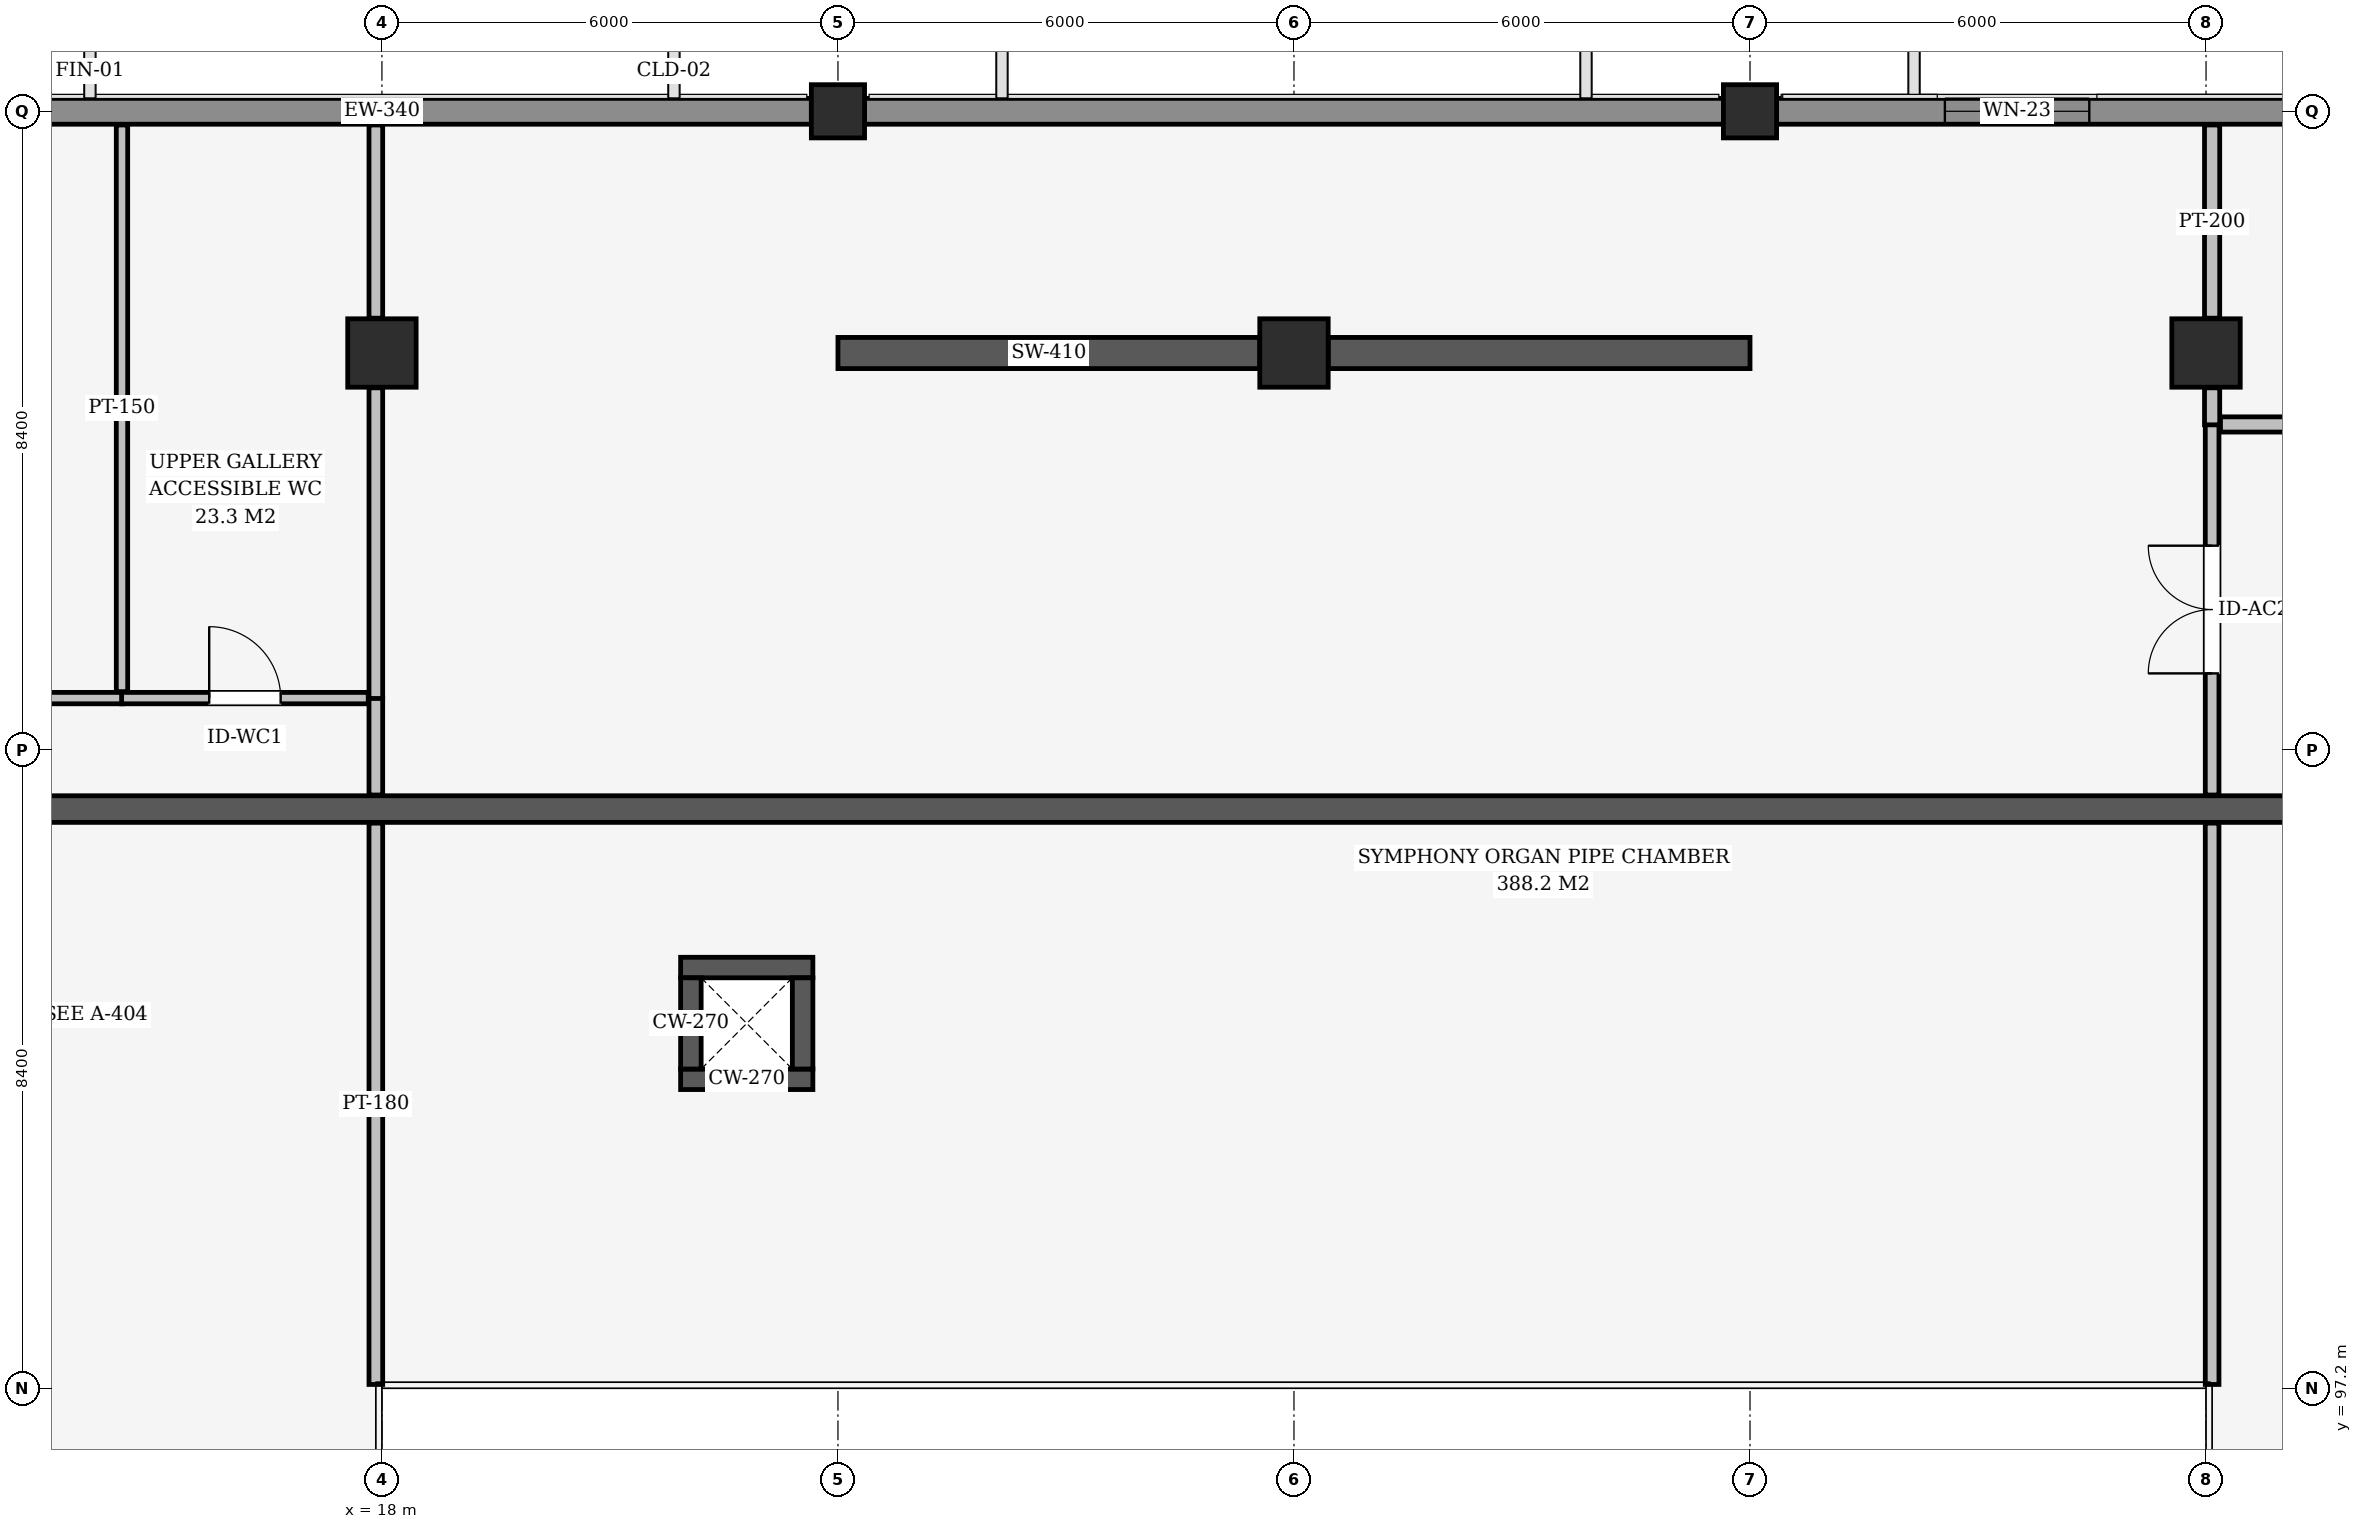
"""IFC4 building model, lengths in metres.
Left out: names, types, materials, properties, quantities, classifications, styles, units other than length and angle.
Written with IfcOpenShell. Run it as: python <this file> out.ifc"""

import sys

from ifc_helpers import new_model, si_unit, direction, frame, frame_2d, origin, origin_2d, place, context, subcontext, project, spatial, rectangle, extrude, element, fill, save


model = new_model("IFC4")
c1 = context("Model", 3, precision=1e-05, world=origin(), true_north=direction((0.0, 1.0)))
c2 = subcontext(c1, "Body", "Model", "MODEL_VIEW")
j1 = project(units=[si_unit("LENGTHUNIT", "METRE"), si_unit("PLANEANGLEUNIT", "RADIAN")], contexts=[c1])
p1 = place(None, origin())
s1 = spatial("IfcSite", under=j1, at=p1, CompositionType="ELEMENT")
p2 = place(p1, origin())
s2 = spatial("IfcBuilding", under=s1, at=p2, CompositionType="ELEMENT")
p3 = place(p2, frame((0.0, 0.0, 13.8)))
s3 = spatial("IfcBuildingStorey", under=s2, at=p3, CompositionType="ELEMENT", Elevation=13.8)
for number, where, z_axis, x_axis in (
    (1, (24.0, 114.0, 0.0), (0.0, 0.0, 1.0), (1.0, 0.0, 0.0)),
    (2, (36.0, 114.0, 0.0), (0.0, 0.0, 1.0), (1.0, 0.0, 0.0)),
):
    element("IfcColumn", number, at=place(p3, frame(where, z_axis=z_axis, x_axis=x_axis)), inside=s3, PredefinedType="COLUMN", context=c2, shape_type="SweptSolid", body=[
        extrude(rectangle(XDim=0.7, YDim=0.7, at=origin_2d()), origin(), (0.0, 0.0, 1.0), 4.5),
    ])
for number, where, z_axis, x_axis in (
    (3, (18.0, 110.82, 0.0), (0.0, 0.0, 1.0), (1.0, 0.0, 0.0)),
    (4, (30.0, 110.82, 0.0), (0.0, 0.0, 1.0), (1.0, 0.0, 0.0)),
    (5, (42.0, 110.82, 0.0), (0.0, 0.0, 1.0), (1.0, 0.0, 0.0)),
):
    element("IfcColumn", number, at=place(p3, frame(where, z_axis=z_axis, x_axis=x_axis)), inside=s3, PredefinedType="COLUMN", context=c2, shape_type="SweptSolid", body=[
        extrude(rectangle(XDim=0.9, YDim=0.9, at=origin_2d()), origin(), (0.0, 0.0, 1.0), 4.5),
    ])
p4 = place(p3, frame((12.005, 104.82, 0.0), z_axis=(0.0, 0.0, 1.0), x_axis=(1.0, 0.0, 0.0)))
e6 = element("IfcWall", 6, at=p4, inside=s3, PredefinedType="SHEAR", context=c2, shape_type="SweptSolid", body=[
    extrude(rectangle(XDim=35.99, YDim=0.35, at=frame_2d((17.995, 0.0))), origin(), (0.0, 0.0, 1.0), 4.2),
])
for number, where, z_axis, x_axis in (
    (7, (24.0, 110.82, 0.0), (0.0, 0.0, 1.0), (1.0, 0.0, 0.0)),
    (8, (30.45, 110.82, 0.0), (0.0, 0.0, 1.0), (1.0, 0.0, 0.0)),
):
    element("IfcWall", number, at=place(p3, frame(where, z_axis=z_axis, x_axis=x_axis)), inside=s3, PredefinedType="SHEAR", context=c2, shape_type="SweptSolid", body=[
        extrude(rectangle(XDim=5.55, YDim=0.41, at=frame_2d((2.775, 0.0))), origin(), (0.0, 0.0, 1.0), 3.505),
    ])
for number, where, z_axis, x_axis in (
    (9, (12.35, 114.0, 0.0), (0.0, 0.0, 1.0), (1.0, 0.0, 0.0)),
    (10, (24.35, 114.0, 0.0), (0.0, 0.0, 1.0), (1.0, 0.0, 0.0)),
):
    element("IfcWall", number, at=place(p3, frame(where, z_axis=z_axis, x_axis=x_axis)), inside=s3, PredefinedType="SOLIDWALL", context=c2, shape_type="SweptSolid", body=[
        extrude(rectangle(XDim=11.3, YDim=0.34, at=frame_2d((5.65, 0.0))), origin(), (0.0, 0.0, 1.0), 3.569),
    ])
p5 = place(p3, frame((36.35, 114.0, 0.0), z_axis=(0.0, 0.0, 1.0), x_axis=(1.0, 0.0, 0.0)))
e11 = element("IfcWall", 11, at=p5, inside=s3, PredefinedType="SOLIDWALL", context=c2, shape_type="SweptSolid", body=[
    extrude(rectangle(XDim=11.3, YDim=0.34, at=frame_2d((5.65, 0.0))), origin(), (0.0, 0.0, 1.0), 3.569),
])
p6 = place(p5, frame((2.214, 0.0, 0.85)))
e12 = element("IfcOpeningElement", 12, at=p6, cuts=e11, PredefinedType="OPENING", context=c2, shape_type="SweptSolid", body=[
    extrude(rectangle(XDim=1.9, YDim=1.6, at=frame_2d((0.95, 0.8))), frame((0.0, 0.18, 0.0), z_axis=(0.0, -1.0, 0.0), x_axis=(1.0, 0.0, 0.0)), (0.0, 0.0, 1.0), 0.36),
])
for number, where, z_axis, x_axis in (
    (13, (21.93, 101.265, 0.0), (0.0, 0.0, 1.0), (1.0, 0.0, 0.0)),
    (14, (21.93, 102.735, 0.0), (0.0, 0.0, 1.0), (1.0, 0.0, 0.0)),
):
    element("IfcWall", number, at=place(p3, frame(where, z_axis=z_axis, x_axis=x_axis)), inside=s3, PredefinedType="SHEAR", context=c2, shape_type="SweptSolid", body=[
        extrude(rectangle(XDim=1.74, YDim=0.27, at=frame_2d((0.87, 0.0))), origin(), (0.0, 0.0, 1.0), 4.2),
    ])
for number, where, z_axis, x_axis in (
    (15, (22.065, 101.4, 0.0), (0.0, 0.0, 1.0), (0.0, 1.0, 0.0)),
    (16, (23.535, 101.4, 0.0), (0.0, 0.0, 1.0), (0.0, 1.0, 0.0)),
):
    element("IfcWall", number, at=place(p3, frame(where, z_axis=z_axis, x_axis=x_axis)), inside=s3, PredefinedType="SHEAR", context=c2, shape_type="SweptSolid", body=[
        extrude(rectangle(XDim=1.2, YDim=0.27, at=frame_2d((0.6, 0.0))), origin(), (0.0, 0.0, 1.0), 4.2),
    ])
p7 = place(p3, frame((17.92, 97.25, 0.0), z_axis=(0.0, 0.0, 1.0), x_axis=(0.0, 1.0, 0.0)))
e17 = element("IfcWall", 17, at=p7, inside=s3, PredefinedType="PARTITIONING", context=c2, shape_type="SweptSolid", body=[
    extrude(rectangle(XDim=7.385, YDim=0.18, at=frame_2d((3.692, 0.0))), origin(), (0.0, 0.0, 1.0), 4.5),
])
p8 = place(p3, frame((17.92, 105.005, 0.0), z_axis=(0.0, 0.0, 1.0), x_axis=(0.0, 1.0, 0.0)))
e18 = element("IfcWall", 18, at=p8, inside=s3, PredefinedType="PARTITIONING", context=c2, shape_type="SweptSolid", body=[
    extrude(rectangle(XDim=1.28, YDim=0.18, at=frame_2d((0.64, 0.0))), origin(), (0.0, 0.0, 1.0), 4.5),
])
p9 = place(p3, frame((17.92, 106.275, 0.0), z_axis=(0.0, 0.0, 1.0), x_axis=(0.0, 1.0, 0.0)))
e19 = element("IfcWall", 19, at=p9, inside=s3, PredefinedType="PARTITIONING", context=c2, shape_type="SweptSolid", body=[
    extrude(rectangle(XDim=4.087, YDim=0.18, at=frame_2d((2.043, 0.0))), origin(), (0.0, 0.0, 1.0), 4.5),
])
p10 = place(p3, frame((17.92, 111.278, 0.0), z_axis=(0.0, 0.0, 1.0), x_axis=(0.0, 1.0, 0.0)))
e20 = element("IfcWall", 20, at=p10, inside=s3, PredefinedType="PARTITIONING", context=c2, shape_type="SweptSolid", body=[
    extrude(rectangle(XDim=2.542, YDim=0.18, at=frame_2d((1.271, 0.0))), origin(), (0.0, 0.0, 1.0), 4.5),
])
p11 = place(p3, frame((42.08, 97.25, 0.0), z_axis=(0.0, 0.0, 1.0), x_axis=(0.0, 1.0, 0.0)))
e21 = element("IfcWall", 21, at=p11, inside=s3, PredefinedType="PARTITIONING", context=c2, shape_type="SweptSolid", body=[
    extrude(rectangle(XDim=7.385, YDim=0.18, at=frame_2d((3.692, 0.0))), origin(), (0.0, 0.0, 1.0), 4.5),
])
p12 = place(p3, frame((42.08, 105.005, 0.0), z_axis=(0.0, 0.0, 1.0), x_axis=(0.0, 1.0, 0.0)))
e22 = element("IfcWall", 22, at=p12, inside=s3, PredefinedType="PARTITIONING", context=c2, shape_type="SweptSolid", body=[
    extrude(rectangle(XDim=4.88, YDim=0.18, at=frame_2d((2.44, 0.0))), origin(), (0.0, 0.0, 1.0), 4.5),
])
p13 = place(p12, frame((1.6, 0.0, 0.0)))
e23 = element("IfcOpeningElement", 23, at=p13, cuts=e22, PredefinedType="OPENING", context=c2, shape_type="SweptSolid", body=[
    extrude(rectangle(XDim=1.68, YDim=2.32, at=frame_2d((0.84, 1.16))), frame((0.0, 0.1, 0.0), z_axis=(0.0, -1.0, 0.0), x_axis=(1.0, 0.0, 0.0)), (0.0, 0.0, 1.0), 0.2),
])
p14 = place(p3, frame((42.08, 109.875, 0.0), z_axis=(0.0, 0.0, 1.0), x_axis=(0.0, 1.0, 0.0)))
e24 = element("IfcWall", 24, at=p14, inside=s3, PredefinedType="PARTITIONING", context=c2, shape_type="SweptSolid", body=[
    extrude(rectangle(XDim=0.487, YDim=0.2, at=frame_2d((0.244, 0.0))), origin(), (0.0, 0.0, 1.0), 4.5),
])
p15 = place(p3, frame((42.08, 111.278, 0.0), z_axis=(0.0, 0.0, 1.0), x_axis=(0.0, 1.0, 0.0)))
e25 = element("IfcWall", 25, at=p15, inside=s3, PredefinedType="PARTITIONING", context=c2, shape_type="SweptSolid", body=[
    extrude(rectangle(XDim=2.542, YDim=0.2, at=frame_2d((1.271, 0.0))), origin(), (0.0, 0.0, 1.0), 4.5),
])
p16 = place(p3, frame((0.19, 106.28, 0.0), z_axis=(0.0, 0.0, 1.0), x_axis=(1.0, 0.0, 0.0)))
e26 = element("IfcWall", 26, at=p16, inside=s3, PredefinedType="PARTITIONING", context=c2, shape_type="SweptSolid", body=[
    extrude(rectangle(XDim=14.395, YDim=0.15, at=frame_2d((7.198, 0.0))), origin(), (0.0, 0.0, 1.0), 4.18),
])
p17 = place(p16, frame((6.692, 0.0, 0.0)))
e27 = element("IfcOpeningElement", 27, at=p17, cuts=e26, PredefinedType="OPENING", context=c2, shape_type="SweptSolid", body=[
    extrude(rectangle(XDim=1.01, YDim=2.1, at=frame_2d((0.505, 1.05))), frame((0.0, 0.085, 0.0), z_axis=(0.0, -1.0, 0.0), x_axis=(1.0, 0.0, 0.0)), (0.0, 0.0, 1.0), 0.17),
])
p18 = place(p3, frame((14.575, 106.28, 0.0), z_axis=(0.0, 0.0, 1.0), x_axis=(1.0, 0.0, 0.0)))
e28 = element("IfcWall", 28, at=p18, inside=s3, PredefinedType="PARTITIONING", context=c2, shape_type="SweptSolid", body=[
    extrude(rectangle(XDim=3.245, YDim=0.15, at=frame_2d((1.623, 0.0))), origin(), (0.0, 0.0, 1.0), 4.18),
])
p19 = place(p18, frame((1.153, 0.0, 0.0)))
e29 = element("IfcOpeningElement", 29, at=p19, cuts=e28, PredefinedType="OPENING", context=c2, shape_type="SweptSolid", body=[
    extrude(rectangle(XDim=0.94, YDim=2.1, at=frame_2d((0.47, 1.05))), frame((0.0, 0.085, 0.0), z_axis=(0.0, -1.0, 0.0), x_axis=(1.0, 0.0, 0.0)), (0.0, 0.0, 1.0), 0.17),
])
p20 = place(p3, frame((14.58, 106.365, 0.0), z_axis=(0.0, 0.0, 1.0), x_axis=(0.0, 1.0, 0.0)))
e30 = element("IfcWall", 30, at=p20, inside=s3, PredefinedType="PARTITIONING", context=c2, shape_type="SweptSolid", body=[
    extrude(rectangle(XDim=7.455, YDim=0.15, at=frame_2d((3.728, 0.0))), origin(), (0.0, 0.0, 1.0), 3.723),
])
p21 = place(p3, frame((42.19, 109.88, 0.0), z_axis=(0.0, 0.0, 1.0), x_axis=(1.0, 0.0, 0.0)))
e31 = element("IfcWall", 31, at=p21, inside=s3, PredefinedType="PARTITIONING", context=c2, shape_type="SweptSolid", body=[
    extrude(rectangle(XDim=17.63, YDim=0.2, at=frame_2d((8.815, 0.0))), origin(), (0.0, 0.0, 1.0), 4.18),
])
p22 = place(p21, frame((3.618, 0.0, 0.0)))
e32 = element("IfcOpeningElement", 32, at=p22, cuts=e31, PredefinedType="OPENING", context=c2, shape_type="SweptSolid", body=[
    extrude(rectangle(XDim=1.56, YDim=2.26, at=frame_2d((0.78, 1.13))), frame((0.0, 0.11, 0.0), z_axis=(0.0, -1.0, 0.0), x_axis=(1.0, 0.0, 0.0)), (0.0, 0.0, 1.0), 0.22),
])
p23 = place(p6, origin())
e33 = element("IfcWindow", 33, at=p23, inside=s3, PartitioningType="SINGLE_PANEL", PredefinedType="WINDOW", context=c2, shape_type="SweptSolid", body=[
    extrude(rectangle(XDim=1.9, YDim=1.6, at=frame_2d((0.95, 0.8))), frame((0.0, 0.03, 0.0), z_axis=(0.0, -1.0, 0.0), x_axis=(1.0, 0.0, 0.0)), (0.0, 0.0, 1.0), 0.06),
])
fill(e12, e33)
p24 = place(p13, origin())
e34 = element("IfcDoor", 34, at=p24, inside=s3, OperationType="DOUBLE_DOOR_SINGLE_SWING", PredefinedType="DOOR", context=c2, shape_type="SweptSolid", body=[
    extrude(rectangle(XDim=1.68, YDim=2.32, at=frame_2d((0.84, 1.16))), frame((0.0, 0.025, 0.0), z_axis=(0.0, -1.0, 0.0), x_axis=(1.0, 0.0, 0.0)), (0.0, 0.0, 1.0), 0.05),
])
fill(e23, e34)
p25 = place(p19, origin())
e35 = element("IfcDoor", 35, at=p25, inside=s3, OperationType="SINGLE_SWING_LEFT", PredefinedType="DOOR", context=c2, shape_type="SweptSolid", body=[
    extrude(rectangle(XDim=0.94, YDim=2.1, at=frame_2d((0.47, 1.05))), frame((0.0, 0.025, 0.0), z_axis=(0.0, -1.0, 0.0), x_axis=(1.0, 0.0, 0.0)), (0.0, 0.0, 1.0), 0.05),
])
fill(e29, e35)
save(model, sys.argv[1])
